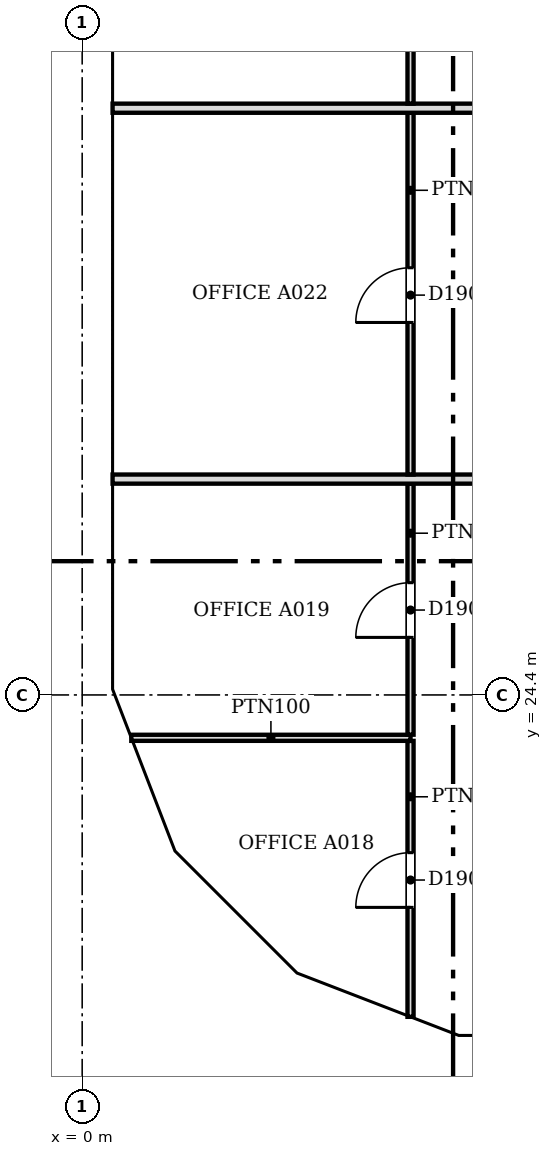
"""IFC4 building model, lengths in metres.
Left out: names, types, materials, properties, quantities, classifications, styles, units other than length and angle.
Written with IfcOpenShell. Run it as: python <this file> out.ifc"""

import sys

from ifc_helpers import new_model, si_unit, direction, frame, frame_2d, origin, place, context, subcontext, project, spatial, polyline, rectangle, outline, extrude, faceted_brep, source, transform, mapped, element, fill, save


model = new_model("IFC4")
c1 = context("Model", 3, precision=1e-05, world=origin(), true_north=direction((0.0, 1.0)))
c2 = subcontext(c1, "Body", "Model", "MODEL_VIEW")
j1 = project(units=[si_unit("LENGTHUNIT", "METRE"), si_unit("PLANEANGLEUNIT", "RADIAN")], contexts=[c1])
p1 = place(None, origin())
s1 = spatial("IfcSite", under=j1, at=p1, CompositionType="ELEMENT")
p2 = place(p1, origin())
s2 = spatial("IfcBuilding", under=s1, at=p2, CompositionType="ELEMENT")
p3 = place(p2, frame((0.0, 0.0, 16.8)))
s3 = spatial("IfcBuildingStorey", under=s2, at=p3, CompositionType="ELEMENT", Elevation=16.8)
m1 = source(origin(), c2, "Body", "SweptSolid", [
    extrude(outline(polyline([(6.1, 0.0), (3.05, 4.5), (0.0, 0.0), (6.1, 0.0)])), frame((0.0, 0.25, 0.0), z_axis=(0.0, -1.0, 0.0), x_axis=(1.0, 0.0, 0.0)), (0.0, 0.0, 1.0), 0.5),
])
p4 = place(p3, frame((0.25, 36.6, 0.0), z_axis=(0.0, 0.0, 1.0), x_axis=(0.0, -1.0, 0.0)))
e1 = element("IfcWall", 1, at=p4, inside=s3, PredefinedType="SOLIDWALL", context=c2, shape_type="MappedRepresentation", body=[
    mapped(m1, transform((0.0, 0.0, 0.0), scale=1.0)),
])
m2 = source(origin(), c2, "Body", "SweptSolid", [
    extrude(outline(polyline([(5.629, 0.25), (3.05, 4.054), (0.471, 0.25), (5.629, 0.25)])), frame((0.0, 0.26, 0.0), z_axis=(0.0, -1.0, 0.0), x_axis=(1.0, 0.0, 0.0)), (0.0, 0.0, 1.0), 0.52),
])
p5 = place(p4, origin())
e2 = element("IfcOpeningElement", 2, at=p5, cuts=e1, PredefinedType="OPENING", context=c2, shape_type="MappedRepresentation", body=[
    mapped(m2, transform((0.0, 0.0, 0.0), scale=1.0)),
])
m3 = source(origin(), c2, "Body", "Brep", [
    faceted_brep([(6.053, -0.25, 0.0), (3.05, -0.25, 4.5), (0.0, -0.25, 0.0), (0.0, 0.25, 0.0), (3.05, 0.25, 4.5), (6.007, 0.25, 0.07), (6.007, 0.25, 0.0), (6.053, 0.0, 0.0)], [[[0, 1, 2]], [[3, 4, 5, 6]], [[5, 4, 1, 0, 7]], [[4, 3, 2, 1]], [[3, 6, 7, 0, 2]], [[7, 6, 5]]]),
])
p6 = place(p3, frame((0.25, 30.5, 0.0), z_axis=(0.0, 0.0, 1.0), x_axis=(0.0, -1.0, 0.0)))
e3 = element("IfcWall", 3, at=p6, inside=s3, PredefinedType="SOLIDWALL", context=c2, shape_type="MappedRepresentation", body=[
    mapped(m3, transform((0.0, 0.0, 0.0), scale=1.0)),
])
m4 = source(origin(), c2, "Body", "SweptSolid", [
    extrude(outline(polyline([(5.586, 0.25), (3.048, 4.052), (0.471, 0.25), (5.586, 0.25)])), frame((0.0, 0.26, 0.0), z_axis=(0.0, -1.0, 0.0), x_axis=(1.0, 0.0, 0.0)), (0.0, 0.0, 1.0), 0.52),
])
p7 = place(p6, origin())
e4 = element("IfcOpeningElement", 4, at=p7, cuts=e3, PredefinedType="OPENING", context=c2, shape_type="MappedRepresentation", body=[
    mapped(m4, transform((0.0, 0.0, 0.0), scale=1.0)),
])
m5 = source(origin(), c2, "Body", "Brep", [
    faceted_brep([(3.003, -0.25, 4.419), (2.95, -0.25, 4.5), (0.0, -0.25, 0.0), (3.003, -0.25, 0.0), (0.047, 0.25, 0.071), (2.898, 0.25, 4.419), (2.898, 0.25, 0.0), (0.047, 0.25, 0.0), (2.95, 0.0, 4.5), (0.0, 0.0, 0.0)], [[[0, 1, 2, 3]], [[4, 5, 6, 7]], [[8, 1, 0]], [[5, 4, 9, 2, 1, 8]], [[7, 6, 3, 2, 9]], [[7, 9, 4]], [[3, 6, 5, 8, 0]]]),
])
p8 = place(p3, frame((0.25, 24.447, 0.0), z_axis=(0.0, 0.0, 1.0), x_axis=(0.35992665181, -0.932980602862, 0.0)))
e5 = element("IfcWall", 5, at=p8, inside=s3, PredefinedType="SOLIDWALL", context=c2, shape_type="MappedRepresentation", body=[
    mapped(m5, transform((0.0, 0.0, 0.0), scale=1.0)),
])
m6 = source(origin(), c2, "Body", "SweptSolid", [
    extrude(outline(polyline([(2.75, 3.739), (0.463, 0.25), (2.75, 0.25), (2.75, 3.739)])), frame((0.0, 0.26, 0.0), z_axis=(0.0, -1.0, 0.0), x_axis=(1.0, 0.0, 0.0)), (0.0, 0.0, 1.0), 0.52),
])
p9 = place(p8, origin())
e6 = element("IfcOpeningElement", 6, at=p9, cuts=e5, PredefinedType="OPENING", context=c2, shape_type="MappedRepresentation", body=[
    mapped(m6, transform((0.0, 0.0, 0.0), scale=1.0)),
])
m7 = source(origin(), c2, "Body", "Brep", [
    faceted_brep([(2.997, -0.25, 0.0), (0.053, -0.25, 4.5), (0.0, -0.25, 4.419), (0.0, -0.25, 0.0), (0.106, 0.25, 4.419), (2.944, 0.25, 0.081), (2.944, 0.25, 0.0), (0.106, 0.25, 0.0), (0.053, 0.0, 4.5), (2.997, 0.0, 0.0)], [[[0, 1, 2, 3]], [[4, 5, 6, 7]], [[5, 4, 8, 1, 0, 9]], [[2, 1, 8]], [[7, 6, 9, 0, 3]], [[7, 3, 2, 8, 4]], [[9, 6, 5]]]),
])
p10 = place(p3, frame((1.274, 21.731, 0.0), z_axis=(0.0, 0.0, 1.0), x_axis=(0.707147509625, -0.707066050402, 0.0)))
e7 = element("IfcWall", 7, at=p10, inside=s3, PredefinedType="SOLIDWALL", context=c2, shape_type="MappedRepresentation", body=[
    mapped(m7, transform((0.0, 0.0, 0.0), scale=1.0)),
])
m8 = source(origin(), c2, "Body", "SweptSolid", [
    extrude(outline(polyline([(2.535, 0.25), (0.253, 3.738), (0.253, 0.25), (2.535, 0.25)])), frame((0.0, 0.26, 0.0), z_axis=(0.0, -1.0, 0.0), x_axis=(1.0, 0.0, 0.0)), (0.0, 0.0, 1.0), 0.52),
])
p11 = place(p10, origin())
e8 = element("IfcOpeningElement", 8, at=p11, cuts=e7, PredefinedType="OPENING", context=c2, shape_type="MappedRepresentation", body=[
    mapped(m8, transform((0.0, 0.0, 0.0), scale=1.0)),
])
m9 = source(origin(), c2, "Body", "Brep", [
    faceted_brep([(2.997, -0.25, 4.43), (2.95, -0.25, 4.5), (0.0, -0.25, 0.0), (2.997, -0.25, 0.0), (0.053, 0.25, 0.081), (2.904, 0.25, 4.429), (2.904, 0.25, 0.0), (0.053, 0.25, 0.0), (2.95, 0.0, 4.5), (0.0, 0.0, 0.0)], [[[0, 1, 2, 3]], [[4, 5, 6, 7]], [[8, 1, 0]], [[5, 4, 9, 2, 1, 8]], [[7, 6, 3, 2, 9]], [[7, 9, 4]], [[3, 6, 5, 8, 0]]]),
])
p12 = place(p3, frame((3.394, 19.612, 0.0), z_axis=(0.0, 0.0, 1.0), x_axis=(0.932990326376, -0.359901446078, 0.0)))
e9 = element("IfcWall", 9, at=p12, inside=s3, PredefinedType="SOLIDWALL", context=c2, shape_type="MappedRepresentation", body=[
    mapped(m9, transform((0.0, 0.0, 0.0), scale=1.0)),
])
p13 = place(p12, origin())
e10 = element("IfcOpeningElement", 10, at=p13, cuts=e9, PredefinedType="OPENING", context=c2, shape_type="MappedRepresentation", body=[
    mapped(m6, transform((0.0, 0.0, 0.0), scale=1.0)),
])
m10 = source(origin(), c2, "Body", "Brep", [
    faceted_brep([(3.05, -0.25, 0.0), (0.047, -0.25, 4.5), (0.0, -0.25, 4.429), (0.0, -0.25, 0.0), (0.093, 0.25, 4.43), (3.05, 0.25, 0.0), (0.093, 0.25, 0.0), (0.047, 0.0, 4.5)], [[[0, 1, 2, 3]], [[4, 5, 6]], [[5, 4, 7, 1, 0]], [[2, 1, 7]], [[6, 5, 0, 3]], [[6, 3, 2, 7, 4]]]),
])
p14 = place(p3, frame((6.1, 18.55, 0.0), z_axis=(0.0, 0.0, 1.0), x_axis=(1.0, 0.0, 0.0)))
e11 = element("IfcWall", 11, at=p14, inside=s3, PredefinedType="SOLIDWALL", context=c2, shape_type="MappedRepresentation", body=[
    mapped(m10, transform((0.0, 0.0, 0.0), scale=1.0)),
])
m11 = source(origin(), c2, "Body", "SweptSolid", [
    extrude(outline(polyline([(2.583, 0.25), (0.247, 3.75), (0.247, 0.25), (2.583, 0.25)])), frame((0.0, 0.26, 0.0), z_axis=(0.0, -1.0, 0.0), x_axis=(1.0, 0.0, 0.0)), (0.0, 0.0, 1.0), 0.52),
])
p15 = place(p14, origin())
e12 = element("IfcOpeningElement", 12, at=p15, cuts=e11, PredefinedType="OPENING", context=c2, shape_type="MappedRepresentation", body=[
    mapped(m11, transform((0.0, 0.0, 0.0), scale=1.0)),
])
p16 = place(p2, frame((0.0, 0.0, 21.3)))
s4 = spatial("IfcBuildingStorey", under=s2, at=p16, CompositionType="ELEMENT", Elevation=21.3)
m12 = source(origin(), c2, "Body", "Brep", [
    faceted_brep([(3.05, -0.25, 0.0), (6.1, -0.25, 4.5), (6.1, -0.25, 4.5), (3.05, -0.25, 9.0), (0.0, -0.25, 4.5), (0.0, 0.25, 4.5), (3.05, 0.25, 9.0), (6.1, 0.25, 4.5), (6.1, 0.25, 4.5), (3.05, 0.25, 0.0)], [[[0, 1, 2, 3, 4]], [[5, 6, 7, 8, 9]], [[9, 8, 1, 0]], [[7, 6, 3, 2]], [[6, 5, 4, 3]], [[5, 9, 0, 4]], [[1, 8, 7, 2]]]),
])
p17 = place(p16, frame((0.25, 39.65, -4.5), z_axis=(0.0, 0.0, 1.0), x_axis=(0.0, -1.0, 0.0)))
e13 = element("IfcWall", 13, at=p17, inside=s4, PredefinedType="SOLIDWALL", context=c2, shape_type="MappedRepresentation", body=[
    mapped(m12, transform((0.0, 0.0, 0.0), scale=1.0)),
])
m13 = source(origin(), c2, "Body", "SweptSolid", [
    extrude(outline(polyline([(3.05, 0.446), (5.798, 4.5), (3.05, 8.554), (0.302, 4.5), (3.05, 0.446)])), frame((0.0, 0.26, 0.0), z_axis=(0.0, -1.0, 0.0), x_axis=(1.0, 0.0, 0.0)), (0.0, 0.0, 1.0), 0.52),
])
p18 = place(p17, origin())
e14 = element("IfcOpeningElement", 14, at=p18, cuts=e13, PredefinedType="OPENING", context=c2, shape_type="MappedRepresentation", body=[
    mapped(m13, transform((0.0, 0.0, 0.0), scale=1.0)),
])
m14 = source(origin(), c2, "Body", "SweptSolid", [
    extrude(outline(polyline([(3.05, 0.0), (6.1, 4.5), (3.05, 9.0), (0.0, 4.5), (3.05, 0.0)])), frame((0.0, 0.25, 0.0), z_axis=(0.0, -1.0, 0.0), x_axis=(1.0, 0.0, 0.0)), (0.0, 0.0, 1.0), 0.5),
])
p19 = place(p16, frame((0.25, 33.55, -4.5), z_axis=(0.0, 0.0, 1.0), x_axis=(0.0, -1.0, 0.0)))
e15 = element("IfcWall", 15, at=p19, inside=s4, PredefinedType="SOLIDWALL", context=c2, shape_type="MappedRepresentation", body=[
    mapped(m14, transform((0.0, 0.0, 0.0), scale=1.0)),
])
p20 = place(p19, origin())
e16 = element("IfcOpeningElement", 16, at=p20, cuts=e15, PredefinedType="OPENING", context=c2, shape_type="MappedRepresentation", body=[
    mapped(m13, transform((0.0, 0.0, 0.0), scale=1.0)),
])
m15 = source(origin(), c2, "Body", "Brep", [
    faceted_brep([(3.003, -0.25, 0.0), (3.05, -0.25, 0.071), (3.05, -0.25, 8.929), (3.003, -0.25, 9.0), (0.0, -0.25, 4.5), (0.0, 0.25, 4.5), (2.957, 0.25, 8.93), (2.957, 0.25, 0.07), (3.003, 0.0, 0.0), (3.003, 0.0, 9.0)], [[[0, 1, 2, 3, 4]], [[5, 6, 7]], [[1, 0, 8]], [[9, 3, 2]], [[6, 5, 4, 3, 9]], [[5, 7, 8, 0, 4]], [[1, 8, 7, 6, 9, 2]]]),
])
p21 = place(p16, frame((0.25, 27.45, -4.5), z_axis=(0.0, 0.0, 1.0), x_axis=(0.0, -1.0, 0.0)))
e17 = element("IfcWall", 17, at=p21, inside=s4, PredefinedType="SOLIDWALL", context=c2, shape_type="MappedRepresentation", body=[
    mapped(m15, transform((0.0, 0.0, 0.0), scale=1.0)),
])
m16 = source(origin(), c2, "Body", "SweptSolid", [
    extrude(outline(polyline([(2.803, 8.25), (0.301, 4.5), (2.803, 0.75), (2.803, 8.25)])), frame((0.0, 0.26, 0.0), z_axis=(0.0, -1.0, 0.0), x_axis=(1.0, 0.0, 0.0)), (0.0, 0.0, 1.0), 0.52),
])
p22 = place(p21, origin())
e18 = element("IfcOpeningElement", 18, at=p22, cuts=e17, PredefinedType="OPENING", context=c2, shape_type="MappedRepresentation", body=[
    mapped(m16, transform((0.0, 0.0, 0.0), scale=1.0)),
])
m17 = source(origin(), c2, "Body", "Brep", [
    faceted_brep([(0.047, -0.25, 0.0), (2.997, -0.25, 4.5), (0.047, -0.25, 9.0), (0.0, -0.25, 8.93), (0.0, -0.25, 0.07), (0.093, 0.25, 8.929), (2.944, 0.25, 4.581), (2.944, 0.25, 4.419), (0.093, 0.25, 0.071), (2.997, 0.0, 4.5), (0.047, 0.0, 0.0), (0.047, 0.0, 9.0)], [[[0, 1, 2, 3, 4]], [[5, 6, 7, 8]], [[8, 7, 9, 1, 0, 10]], [[6, 5, 11, 2, 1, 9]], [[3, 2, 11]], [[10, 0, 4]], [[8, 10, 4, 3, 11, 5]], [[9, 7, 6]]]),
])
p23 = place(p16, frame((0.233, 24.49, -4.5), z_axis=(0.0, 0.0, 1.0), x_axis=(0.359901446078, -0.932990326376, 0.0)))
e19 = element("IfcWall", 19, at=p23, inside=s4, PredefinedType="SOLIDWALL", context=c2, shape_type="MappedRepresentation", body=[
    mapped(m17, transform((0.0, 0.0, 0.0), scale=1.0)),
])
m18 = source(origin(), c2, "Body", "SweptSolid", [
    extrude(outline(polyline([(0.247, 0.761), (2.698, 4.5), (0.247, 8.239), (0.247, 0.761)])), frame((0.0, 0.26, 0.0), z_axis=(0.0, -1.0, 0.0), x_axis=(1.0, 0.0, 0.0)), (0.0, 0.0, 1.0), 0.52),
])
p24 = place(p23, origin())
e20 = element("IfcOpeningElement", 20, at=p24, cuts=e19, PredefinedType="OPENING", context=c2, shape_type="MappedRepresentation", body=[
    mapped(m18, transform((0.0, 0.0, 0.0), scale=1.0)),
])
m19 = source(origin(), c2, "Body", "Brep", [
    faceted_brep([(2.944, -0.25, 0.0), (2.997, -0.25, 0.081), (2.997, -0.25, 8.919), (2.944, -0.25, 9.0), (0.0, -0.25, 4.5), (0.053, 0.25, 4.581), (2.891, 0.25, 8.919), (2.891, 0.25, 0.081), (0.053, 0.25, 4.419), (2.944, 0.0, 0.0), (2.944, 0.0, 9.0), (0.0, 0.0, 4.5)], [[[0, 1, 2, 3, 4]], [[5, 6, 7, 8]], [[1, 0, 9]], [[10, 3, 2]], [[6, 5, 11, 4, 3, 10]], [[8, 7, 9, 0, 4, 11]], [[8, 11, 5]], [[1, 9, 7, 6, 10, 2]]]),
])
p25 = place(p16, frame((1.312, 21.694, -4.5), z_axis=(0.0, 0.0, 1.0), x_axis=(0.707066050402, -0.707147509625, 0.0)))
e21 = element("IfcWall", 21, at=p25, inside=s4, PredefinedType="SOLIDWALL", context=c2, shape_type="MappedRepresentation", body=[
    mapped(m19, transform((0.0, 0.0, 0.0), scale=1.0)),
])
m20 = source(origin(), c2, "Body", "SweptSolid", [
    extrude(outline(polyline([(2.744, 8.238), (0.299, 4.5), (2.744, 0.762), (2.744, 8.238)])), frame((0.0, 0.26, 0.0), z_axis=(0.0, -1.0, 0.0), x_axis=(1.0, 0.0, 0.0)), (0.0, 0.0, 1.0), 0.52),
])
p26 = place(p25, origin())
e22 = element("IfcOpeningElement", 22, at=p26, cuts=e21, PredefinedType="OPENING", context=c2, shape_type="MappedRepresentation", body=[
    mapped(m20, transform((0.0, 0.0, 0.0), scale=1.0)),
])
m21 = source(origin(), c2, "Body", "Brep", [
    faceted_brep([(0.053, -0.25, 0.0), (3.003, -0.25, 4.5), (0.053, -0.25, 9.0), (0.0, -0.25, 8.919), (0.0, -0.25, 0.081), (0.106, 0.25, 8.919), (2.957, 0.25, 4.571), (2.957, 0.25, 4.429), (0.106, 0.25, 0.081), (3.003, 0.0, 4.5), (0.053, 0.0, 0.0), (0.053, 0.0, 9.0)], [[[0, 1, 2, 3, 4]], [[5, 6, 7, 8]], [[8, 7, 9, 1, 0, 10]], [[6, 5, 11, 2, 1, 9]], [[3, 2, 11]], [[10, 0, 4]], [[8, 10, 4, 3, 11, 5]], [[9, 7, 6]]]),
])
p27 = place(p16, frame((3.344, 19.631, -4.5), z_axis=(0.0, 0.0, 1.0), x_axis=(0.933007896601, -0.359855894603, 0.0)))
e23 = element("IfcWall", 23, at=p27, inside=s4, PredefinedType="SOLIDWALL", context=c2, shape_type="MappedRepresentation", body=[
    mapped(m21, transform((0.0, 0.0, 0.0), scale=1.0)),
])
m22 = source(origin(), c2, "Body", "SweptSolid", [
    extrude(outline(polyline([(0.253, 0.761), (2.705, 4.5), (0.253, 8.239), (0.253, 0.761)])), frame((0.0, 0.26, 0.0), z_axis=(0.0, -1.0, 0.0), x_axis=(1.0, 0.0, 0.0)), (0.0, 0.0, 1.0), 0.52),
])
p28 = place(p27, origin())
e24 = element("IfcOpeningElement", 24, at=p28, cuts=e23, PredefinedType="OPENING", context=c2, shape_type="MappedRepresentation", body=[
    mapped(m22, transform((0.0, 0.0, 0.0), scale=1.0)),
])
m23 = source(origin(), c2, "Body", "Brep", [
    faceted_brep([(3.003, -0.25, 0.0), (6.053, -0.25, 4.5), (3.003, -0.25, 9.0), (0.0, -0.25, 4.5), (0.047, 0.25, 4.57), (3.003, 0.25, 9.0), (6.053, 0.25, 4.5), (3.003, 0.25, 0.0), (0.047, 0.25, 4.43), (0.0, 0.0, 4.5)], [[[0, 1, 2, 3]], [[4, 5, 6, 7, 8]], [[7, 6, 1, 0]], [[6, 5, 2, 1]], [[5, 4, 9, 3, 2]], [[8, 7, 0, 3, 9]], [[8, 9, 4]]]),
])
p29 = place(p16, frame((6.146, 18.55, -4.5), z_axis=(0.0, 0.0, 1.0), x_axis=(1.0, 0.0, 0.0)))
e25 = element("IfcWall", 25, at=p29, inside=s4, PredefinedType="SOLIDWALL", context=c2, shape_type="MappedRepresentation", body=[
    mapped(m23, transform((0.0, 0.0, 0.0), scale=1.0)),
])
m24 = source(origin(), c2, "Body", "SweptSolid", [
    extrude(outline(polyline([(3.005, 0.448), (5.751, 4.5), (3.005, 8.552), (0.301, 4.5), (3.005, 0.448)])), frame((0.0, 0.26, 0.0), z_axis=(0.0, -1.0, 0.0), x_axis=(1.0, 0.0, 0.0)), (0.0, 0.0, 1.0), 0.52),
])
p30 = place(p29, origin())
e26 = element("IfcOpeningElement", 26, at=p30, cuts=e25, PredefinedType="OPENING", context=c2, shape_type="MappedRepresentation", body=[
    mapped(m24, transform((0.0, 0.0, 0.0), scale=1.0)),
])
p31 = place(p3, frame((5.4, 19.106, 0.0), z_axis=(0.0, 0.0, 1.0), x_axis=(0.0, 1.0, 0.0)))
e27 = element("IfcWall", 27, at=p31, inside=s3, PredefinedType="PARTITIONING", context=c2, shape_type="SweptSolid", body=[
    extrude(rectangle(XDim=4.538, YDim=0.1, at=frame_2d((2.269, 0.0))), origin(), (0.0, 0.0, 1.0), 3.415),
])
m25 = source(origin(), c2, "Body", "SweptSolid", [
    extrude(rectangle(XDim=0.9, YDim=2.1, at=frame_2d((0.45, 1.05))), frame((0.0, 0.06, 0.0), z_axis=(0.0, -1.0, 0.0), x_axis=(1.0, 0.0, 0.0)), (0.0, 0.0, 1.0), 0.12),
])
p32 = place(p31, frame((1.8, 0.0, 0.0)))
e28 = element("IfcOpeningElement", 28, at=p32, cuts=e27, PredefinedType="OPENING", context=c2, shape_type="MappedRepresentation", body=[
    mapped(m25, transform((0.0, 0.0, 0.0), scale=1.0)),
])
p33 = place(p3, frame((0.808, 23.695, 0.0), z_axis=(0.0, 0.0, 1.0), x_axis=(1.0, 0.0, 0.0)))
e29 = element("IfcWall", 29, at=p33, inside=s3, PredefinedType="PARTITIONING", context=c2, shape_type="SweptSolid", body=[
    extrude(rectangle(XDim=4.592, YDim=0.1, at=frame_2d((2.296, 0.0))), origin(), (0.0, 0.0, 1.0), 3.415),
])
p34 = place(p3, frame((5.4, 23.746, 0.0), z_axis=(0.0, 0.0, 1.0), x_axis=(0.0, 1.0, 0.0)))
e30 = element("IfcWall", 30, at=p34, inside=s3, PredefinedType="PARTITIONING", context=c2, shape_type="SweptSolid", body=[
    extrude(rectangle(XDim=4.128, YDim=0.1, at=frame_2d((2.064, 0.0))), origin(), (0.0, 0.0, 1.0), 3.415),
])
p35 = place(p34, frame((1.6, 0.0, 0.0)))
e31 = element("IfcOpeningElement", 31, at=p35, cuts=e30, PredefinedType="OPENING", context=c2, shape_type="MappedRepresentation", body=[
    mapped(m25, transform((0.0, 0.0, 0.0), scale=1.0)),
])
p36 = place(p3, frame((0.5, 27.95, 0.0), z_axis=(0.0, 0.0, 1.0), x_axis=(1.0, 0.0, 0.0)))
e32 = element("IfcWall", 32, at=p36, inside=s3, PredefinedType="PARTITIONING", context=c2, shape_type="SweptSolid", body=[
    extrude(rectangle(XDim=24.174, YDim=0.15, at=frame_2d((12.087, 0.0))), origin(), (0.0, 0.0, 1.0), 3.415),
])
p37 = place(p3, frame((5.4, 28.026, 0.0), z_axis=(0.0, 0.0, 1.0), x_axis=(0.0, 1.0, 0.0)))
e33 = element("IfcWall", 33, at=p37, inside=s3, PredefinedType="PARTITIONING", context=c2, shape_type="SweptSolid", body=[
    extrude(rectangle(XDim=5.948, YDim=0.1, at=frame_2d((2.974, 0.0))), origin(), (0.0, 0.0, 1.0), 3.415),
])
p38 = place(p37, frame((2.5, 0.0, 0.0)))
e34 = element("IfcOpeningElement", 34, at=p38, cuts=e33, PredefinedType="OPENING", context=c2, shape_type="MappedRepresentation", body=[
    mapped(m25, transform((0.0, 0.0, 0.0), scale=1.0)),
])
p39 = place(p3, frame((0.5, 34.05, 0.0), z_axis=(0.0, 0.0, 1.0), x_axis=(1.0, 0.0, 0.0)))
e35 = element("IfcWall", 35, at=p39, inside=s3, PredefinedType="PARTITIONING", context=c2, shape_type="SweptSolid", body=[
    extrude(rectangle(XDim=24.174, YDim=0.15, at=frame_2d((12.087, 0.0))), origin(), (0.0, 0.0, 1.0), 3.415),
])
p40 = place(p3, frame((5.4, 34.126, 0.0), z_axis=(0.0, 0.0, 1.0), x_axis=(0.0, 1.0, 0.0)))
e36 = element("IfcWall", 36, at=p40, inside=s3, PredefinedType="PARTITIONING", context=c2, shape_type="SweptSolid", body=[
    extrude(rectangle(XDim=4.874, YDim=0.1, at=frame_2d((2.437, 0.0))), origin(), (0.0, 0.0, 1.0), 3.415),
])
p41 = place(p40, frame((2.0, 0.0, 0.0)))
e37 = element("IfcOpeningElement", 37, at=p41, cuts=e36, PredefinedType="OPENING", context=c2, shape_type="MappedRepresentation", body=[
    mapped(m25, transform((0.0, 0.0, 0.0), scale=1.0)),
])
m26 = source(origin(), c2, "Body", "SweptSolid", [
    extrude(rectangle(XDim=0.9, YDim=2.1, at=frame_2d((0.45, 1.05))), frame((0.0, 0.025, 0.0), z_axis=(0.0, -1.0, 0.0), x_axis=(1.0, 0.0, 0.0)), (0.0, 0.0, 1.0), 0.05),
])
p42 = place(p35, origin())
e38 = element("IfcDoor", 38, at=p42, inside=s3, OperationType="SINGLE_SWING_LEFT", PredefinedType="DOOR", context=c2, shape_type="MappedRepresentation", body=[
    mapped(m26, transform((0.0, 0.0, 0.0), scale=1.0)),
])
fill(e31, e38)
p43 = place(p32, origin())
e39 = element("IfcDoor", 39, at=p43, inside=s3, OperationType="SINGLE_SWING_LEFT", PredefinedType="DOOR", context=c2, shape_type="MappedRepresentation", body=[
    mapped(m26, transform((0.0, 0.0, 0.0), scale=1.0)),
])
fill(e28, e39)
p44 = place(p38, origin())
e40 = element("IfcDoor", 40, at=p44, inside=s3, OperationType="SINGLE_SWING_LEFT", PredefinedType="DOOR", context=c2, shape_type="MappedRepresentation", body=[
    mapped(m26, transform((0.0, 0.0, 0.0), scale=1.0)),
])
fill(e34, e40)
save(model, sys.argv[1])
